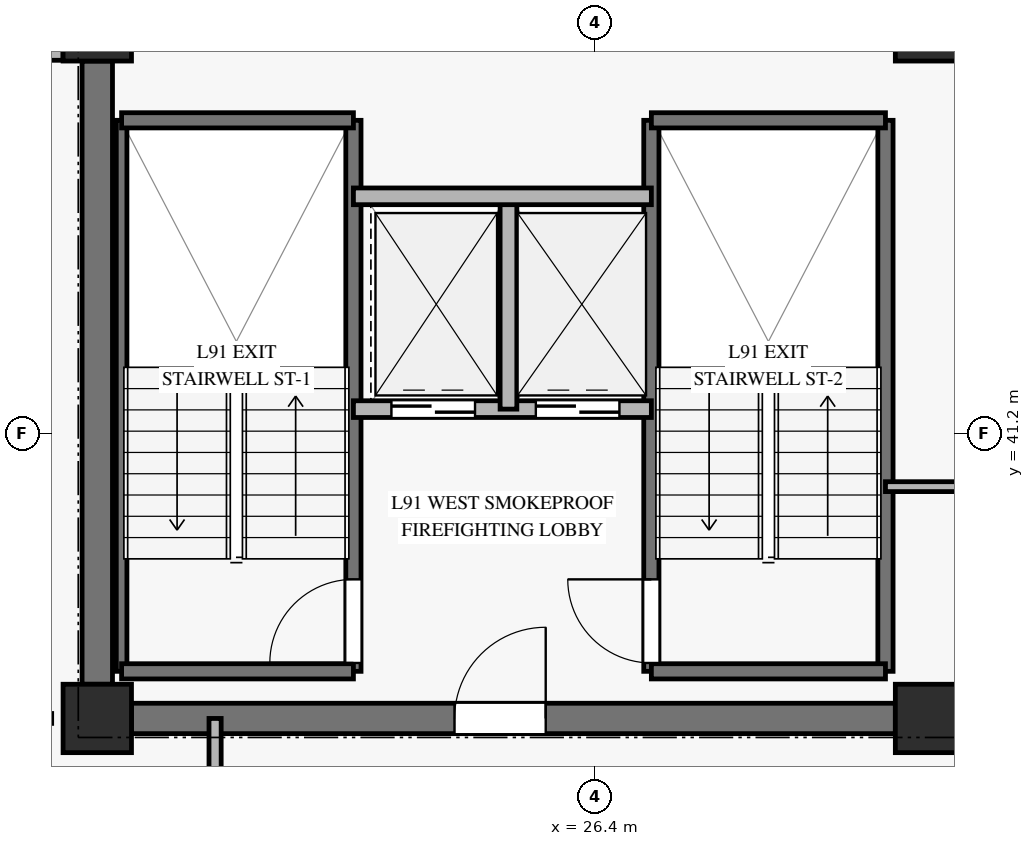
"""IFC4 building model, lengths in metres.
Left out: names, types, materials, properties, quantities, classifications, styles, units other than length and angle.
Written with IfcOpenShell. Run it as: python <this file> out.ifc"""

import sys

from ifc_helpers import new_model, si_unit, direction, frame, frame_2d, origin, origin_2d, place, context, subcontext, project, spatial, rectangle, extrude, source, transform, mapped, element, fill, save


model = new_model("IFC4")
c1 = context("Model", 3, precision=1e-05, world=origin(), true_north=direction((0.0, 1.0)))
c2 = subcontext(c1, "Body", "Model", "MODEL_VIEW")
j1 = project(units=[si_unit("LENGTHUNIT", "METRE"), si_unit("PLANEANGLEUNIT", "RADIAN")], contexts=[c1])
p1 = place(None, origin())
s1 = spatial("IfcSite", under=j1, at=p1, CompositionType="ELEMENT")
p2 = place(p1, origin())
s2 = spatial("IfcBuilding", under=s1, at=p2, CompositionType="ELEMENT")
p3 = place(p2, frame((0.0, 0.0, 349.3)))
s3 = spatial("IfcBuildingStorey", under=s2, at=p3, CompositionType="ELEMENT", Elevation=349.3)
m1 = source(origin(), c2, "Body", "SweptSolid", [
    extrude(rectangle(XDim=0.9, YDim=0.9, at=origin_2d()), origin(), (0.0, 0.0, 1.0), 3.08),
])
for number, where, z_axis, x_axis in (
    (1, (19.85, 37.45, 0.0), (0.0, 0.0, 1.0), (1.0, 0.0, 0.0)),
    (2, (19.85, 46.55, 0.0), (0.0, 0.0, 1.0), (1.0, 0.0, 0.0)),
    (3, (30.8, 37.45, 0.0), (0.0, 0.0, 1.0), (1.0, 0.0, 0.0)),
    (4, (30.8, 46.55, 0.0), (0.0, 0.0, 1.0), (1.0, 0.0, 0.0)),
):
    element("IfcColumn", number, at=place(p3, frame(where, z_axis=z_axis, x_axis=x_axis)), inside=s3, PredefinedType="PILASTER", context=c2, shape_type="MappedRepresentation", body=[
        mapped(m1, transform((0.0, 0.0, 0.0), x_axis=(1.0, 0.0, 0.0), y_axis=(0.0, 1.0, 0.0), z_axis=(0.0, 0.0, 1.0), scale=1.0)),
    ])
p4 = place(p3, frame((20.3, 37.45, 0.0), z_axis=(0.0, 0.0, 1.0), x_axis=(1.0, 0.0, 0.0)))
e5 = element("IfcWall", 5, at=p4, inside=s3, PredefinedType="SHEAR", context=c2, shape_type="SweptSolid", body=[
    extrude(rectangle(XDim=10.05, YDim=0.4, at=frame_2d((5.025, 0.0))), origin(), (0.0, 0.0, 1.0), 3.08),
])
p5 = place(p4, frame((4.25, 0.0, 0.0)))
e6 = element("IfcOpeningElement", 6, at=p5, cuts=e5, PredefinedType="OPENING", context=c2, shape_type="SweptSolid", body=[
    extrude(rectangle(XDim=1.2, YDim=2.15, at=frame_2d((0.6, 1.075))), frame((0.0, 0.21, 0.0), z_axis=(0.0, -1.0, 0.0), x_axis=(1.0, 0.0, 0.0)), (0.0, 0.0, 1.0), 0.42),
])
p6 = place(p3, frame((19.85, 37.9, 0.0), z_axis=(0.0, 0.0, 1.0), x_axis=(0.0, 1.0, 0.0)))
e7 = element("IfcWall", 7, at=p6, inside=s3, PredefinedType="SHEAR", context=c2, shape_type="SweptSolid", body=[
    extrude(rectangle(XDim=8.2, YDim=0.4, at=frame_2d((4.1, 0.0))), origin(), (0.0, 0.0, 1.0), 3.08),
])
p7 = place(p3, frame((14.5, 46.25, 0.0), z_axis=(0.0, 0.0, 1.0), x_axis=(1.0, 0.0, 0.0)))
e8 = element("IfcWall", 8, at=p7, inside=s3, PredefinedType="SOLIDWALL", context=c2, shape_type="SweptSolid", body=[
    extrude(rectangle(XDim=4.9, YDim=0.28, at=frame_2d((2.45, 0.0))), origin(), (0.0, 0.0, 1.0), 2.71),
])
p8 = place(p7, frame((1.65, 0.0, 0.45)))
e9 = element("IfcOpeningElement", 9, at=p8, cuts=e8, PredefinedType="OPENING", context=c2, shape_type="SweptSolid", body=[
    extrude(rectangle(XDim=1.6, YDim=2.0, at=frame_2d((0.8, 1.0))), frame((0.0, 0.15, 0.0), z_axis=(0.0, -1.0, 0.0), x_axis=(1.0, 0.0, 0.0)), (0.0, 0.0, 1.0), 0.3),
])
p9 = place(p3, frame((20.17, 38.07, 0.0), z_axis=(0.0, 0.0, 1.0), x_axis=(0.0, 1.0, 0.0)))
e10 = element("IfcWall", 10, at=p9, inside=s3, PredefinedType="SOLIDWALL", context=c2, shape_type="SweptSolid", body=[
    extrude(rectangle(XDim=7.25, YDim=0.14, at=frame_2d((3.625, 0.0))), origin(), (0.0, 0.0, 1.0), 3.4),
])
p10 = place(p3, frame((23.22, 38.07, 0.0), z_axis=(0.0, 0.0, 1.0), x_axis=(0.0, 1.0, 0.0)))
e11 = element("IfcWall", 11, at=p10, inside=s3, PredefinedType="SOLIDWALL", context=c2, shape_type="SweptSolid", body=[
    extrude(rectangle(XDim=7.25, YDim=0.2, at=frame_2d((3.625, 0.0))), origin(), (0.0, 0.0, 1.0), 3.4),
])
p11 = place(p10, frame((0.11, 0.0, 0.0)))
e12 = element("IfcOpeningElement", 12, at=p11, cuts=e11, PredefinedType="OPENING", context=c2, shape_type="SweptSolid", body=[
    extrude(rectangle(XDim=1.1, YDim=2.15, at=frame_2d((0.55, 1.075))), frame((0.0, 0.11, 0.0), z_axis=(0.0, -1.0, 0.0), x_axis=(1.0, 0.0, 0.0)), (0.0, 0.0, 1.0), 0.22),
])
for number, where, z_axis, x_axis in (
    (13, (20.17, 45.32, 0.0), (0.0, 0.0, 1.0), (1.0, 0.0, 0.0)),
    (14, (20.17, 38.07, 0.0), (0.0, 0.0, 1.0), (1.0, 0.0, 0.0)),
):
    element("IfcWall", number, at=place(p3, frame(where, z_axis=z_axis, x_axis=x_axis)), inside=s3, PredefinedType="SOLIDWALL", context=c2, shape_type="SweptSolid", body=[
        extrude(rectangle(XDim=3.05, YDim=0.2, at=frame_2d((1.525, 0.0))), origin(), (0.0, 0.0, 1.0), 3.4),
    ])
p12 = place(p3, frame((27.14, 38.07, 0.0), z_axis=(0.0, 0.0, 1.0), x_axis=(0.0, 1.0, 0.0)))
e15 = element("IfcWall", 15, at=p12, inside=s3, PredefinedType="SOLIDWALL", context=c2, shape_type="SweptSolid", body=[
    extrude(rectangle(XDim=7.25, YDim=0.2, at=frame_2d((3.625, 0.0))), origin(), (0.0, 0.0, 1.0), 3.4),
])
p13 = place(p12, frame((0.11, 0.0, 0.0)))
e16 = element("IfcOpeningElement", 16, at=p13, cuts=e15, PredefinedType="OPENING", context=c2, shape_type="SweptSolid", body=[
    extrude(rectangle(XDim=1.1, YDim=2.15, at=frame_2d((0.55, 1.075))), frame((0.0, 0.11, 0.0), z_axis=(0.0, -1.0, 0.0), x_axis=(1.0, 0.0, 0.0)), (0.0, 0.0, 1.0), 0.22),
])
p14 = place(p3, frame((30.22, 38.07, 0.0), z_axis=(0.0, 0.0, 1.0), x_axis=(0.0, 1.0, 0.0)))
e17 = element("IfcWall", 17, at=p14, inside=s3, PredefinedType="SOLIDWALL", context=c2, shape_type="SweptSolid", body=[
    extrude(rectangle(XDim=7.25, YDim=0.2, at=frame_2d((3.625, 0.0))), origin(), (0.0, 0.0, 1.0), 3.4),
])
for number, where, z_axis, x_axis in (
    (18, (27.14, 45.32, 0.0), (0.0, 0.0, 1.0), (1.0, 0.0, 0.0)),
    (19, (27.14, 38.07, 0.0), (0.0, 0.0, 1.0), (1.0, 0.0, 0.0)),
):
    element("IfcWall", number, at=place(p3, frame(where, z_axis=z_axis, x_axis=x_axis)), inside=s3, PredefinedType="SOLIDWALL", context=c2, shape_type="SweptSolid", body=[
        extrude(rectangle(XDim=3.08, YDim=0.2, at=frame_2d((1.54, 0.0))), origin(), (0.0, 0.0, 1.0), 3.4),
    ])
p15 = place(p3, frame((23.22, 41.52, 0.0), z_axis=(0.0, 0.0, 1.0), x_axis=(1.0, 0.0, 0.0)))
e20 = element("IfcWall", 20, at=p15, inside=s3, PredefinedType="SOLIDWALL", context=c2, shape_type="SweptSolid", body=[
    extrude(rectangle(XDim=3.92, YDim=0.22, at=frame_2d((1.96, 0.0))), origin(), (0.0, 0.0, 1.0), 3.08),
])
p16 = place(p15, frame((0.5, 0.0, 0.0)))
e21 = element("IfcOpeningElement", 21, at=p16, cuts=e20, PredefinedType="OPENING", context=c2, shape_type="SweptSolid", body=[
    extrude(rectangle(XDim=1.1, YDim=2.2, at=frame_2d((0.55, 1.1))), frame((0.0, 0.12, 0.0), z_axis=(0.0, -1.0, 0.0), x_axis=(1.0, 0.0, 0.0)), (0.0, 0.0, 1.0), 0.24),
])
p17 = place(p15, frame((2.4, 0.0, 0.0)))
e22 = element("IfcOpeningElement", 22, at=p17, cuts=e20, PredefinedType="OPENING", context=c2, shape_type="SweptSolid", body=[
    extrude(rectangle(XDim=1.1, YDim=2.2, at=frame_2d((0.55, 1.1))), frame((0.0, 0.12, 0.0), z_axis=(0.0, -1.0, 0.0), x_axis=(1.0, 0.0, 0.0)), (0.0, 0.0, 1.0), 0.24),
])
p18 = place(p3, frame((25.26, 41.52, 0.0), z_axis=(0.0, 0.0, 1.0), x_axis=(0.0, 1.0, 0.0)))
e23 = element("IfcWall", 23, at=p18, inside=s3, PredefinedType="SOLIDWALL", context=c2, shape_type="SweptSolid", body=[
    extrude(rectangle(XDim=2.8, YDim=0.22, at=frame_2d((1.4, 0.0))), origin(), (0.0, 0.0, 1.0), 3.08),
])
p19 = place(p3, frame((23.22, 44.32, 0.0), z_axis=(0.0, 0.0, 1.0), x_axis=(1.0, 0.0, 0.0)))
e24 = element("IfcWall", 24, at=p19, inside=s3, PredefinedType="SOLIDWALL", context=c2, shape_type="SweptSolid", body=[
    extrude(rectangle(XDim=3.92, YDim=0.22, at=frame_2d((1.96, 0.0))), origin(), (0.0, 0.0, 1.0), 3.08),
])
p20 = place(p3, frame((30.22, 40.5, 0.0), z_axis=(0.0, 0.0, 1.0), x_axis=(1.0, 0.0, 0.0)))
e25 = element("IfcWall", 25, at=p20, inside=s3, PredefinedType="PARTITIONING", context=c2, shape_type="SweptSolid", body=[
    extrude(rectangle(XDim=2.96, YDim=0.13, at=frame_2d((1.48, 0.0))), origin(), (0.0, 0.0, 1.0), 2.365),
])
p21 = place(p3, frame((21.4, 23.5, 0.0), z_axis=(0.0, 0.0, 1.0), x_axis=(0.0, 1.0, 0.0)))
e26 = element("IfcWall", 26, at=p21, inside=s3, PredefinedType="PARTITIONING", context=c2, shape_type="SweptSolid", body=[
    extrude(rectangle(XDim=13.95, YDim=0.16, at=frame_2d((6.975, 0.0))), origin(), (0.0, 0.0, 1.0), 2.665),
])
p22 = place(p21, frame((11.82, 0.0, 0.0)))
e27 = element("IfcOpeningElement", 27, at=p22, cuts=e26, PredefinedType="OPENING", context=c2, shape_type="SweptSolid", body=[
    extrude(rectangle(XDim=1.05, YDim=2.15, at=frame_2d((0.525, 1.075))), frame((0.0, 0.09, 0.0), z_axis=(0.0, -1.0, 0.0), x_axis=(1.0, 0.0, 0.0)), (0.0, 0.0, 1.0), 0.18),
])
m2 = source(origin(), c2, "Body", "SweptSolid", [
    extrude(rectangle(XDim=1.1, YDim=2.15, at=frame_2d((0.55, 1.075))), frame((0.0, 0.025, 0.0), z_axis=(0.0, -1.0, 0.0), x_axis=(1.0, 0.0, 0.0)), (0.0, 0.0, 1.0), 0.05),
])
p23 = place(p11, origin())
e28 = element("IfcDoor", 28, at=p23, inside=s3, OperationType="SINGLE_SWING_LEFT", PredefinedType="DOOR", context=c2, shape_type="MappedRepresentation", body=[
    mapped(m2, transform((0.0, 0.0, 0.0), x_axis=(1.0, 0.0, 0.0), y_axis=(0.0, 1.0, 0.0), z_axis=(0.0, 0.0, 1.0), scale=1.0)),
])
fill(e12, e28)
p24 = place(p13, origin())
e29 = element("IfcDoor", 29, at=p24, inside=s3, OperationType="SINGLE_SWING_RIGHT", PredefinedType="DOOR", context=c2, shape_type="MappedRepresentation", body=[
    mapped(m2, transform((0.0, 0.0, 0.0), x_axis=(1.0, 0.0, 0.0), y_axis=(0.0, 1.0, 0.0), z_axis=(0.0, 0.0, 1.0), scale=1.0)),
])
fill(e16, e29)
m3 = source(origin(), c2, "Body", "SweptSolid", [
    extrude(rectangle(XDim=1.1, YDim=2.2, at=frame_2d((0.55, 1.1))), frame((0.0, 0.025, 0.0), z_axis=(0.0, -1.0, 0.0), x_axis=(1.0, 0.0, 0.0)), (0.0, 0.0, 1.0), 0.05),
])
p25 = place(p16, origin())
e30 = element("IfcDoor", 30, at=p25, inside=s3, OperationType="SLIDING_TO_LEFT", PredefinedType="DOOR", context=c2, shape_type="MappedRepresentation", body=[
    mapped(m3, transform((0.0, 0.0, 0.0), x_axis=(1.0, 0.0, 0.0), y_axis=(0.0, 1.0, 0.0), z_axis=(0.0, 0.0, 1.0), scale=1.0)),
])
fill(e21, e30)
p26 = place(p17, origin())
e31 = element("IfcDoor", 31, at=p26, inside=s3, OperationType="SLIDING_TO_LEFT", PredefinedType="DOOR", context=c2, shape_type="MappedRepresentation", body=[
    mapped(m3, transform((0.0, 0.0, 0.0), x_axis=(1.0, 0.0, 0.0), y_axis=(0.0, 1.0, 0.0), z_axis=(0.0, 0.0, 1.0), scale=1.0)),
])
fill(e22, e31)
m4 = source(origin(), c2, "Body", "SweptSolid", [
    extrude(rectangle(XDim=1.2, YDim=2.15, at=frame_2d((0.6, 1.075))), frame((0.0, 0.025, 0.0), z_axis=(0.0, -1.0, 0.0), x_axis=(1.0, 0.0, 0.0)), (0.0, 0.0, 1.0), 0.05),
])
p27 = place(p5, origin())
e32 = element("IfcDoor", 32, at=p27, inside=s3, OperationType="SINGLE_SWING_RIGHT", PredefinedType="DOOR", context=c2, shape_type="MappedRepresentation", body=[
    mapped(m4, transform((0.0, 0.0, 0.0), x_axis=(1.0, 0.0, 0.0), y_axis=(0.0, 1.0, 0.0), z_axis=(0.0, 0.0, 1.0), scale=1.0)),
])
fill(e6, e32)
save(model, sys.argv[1])
